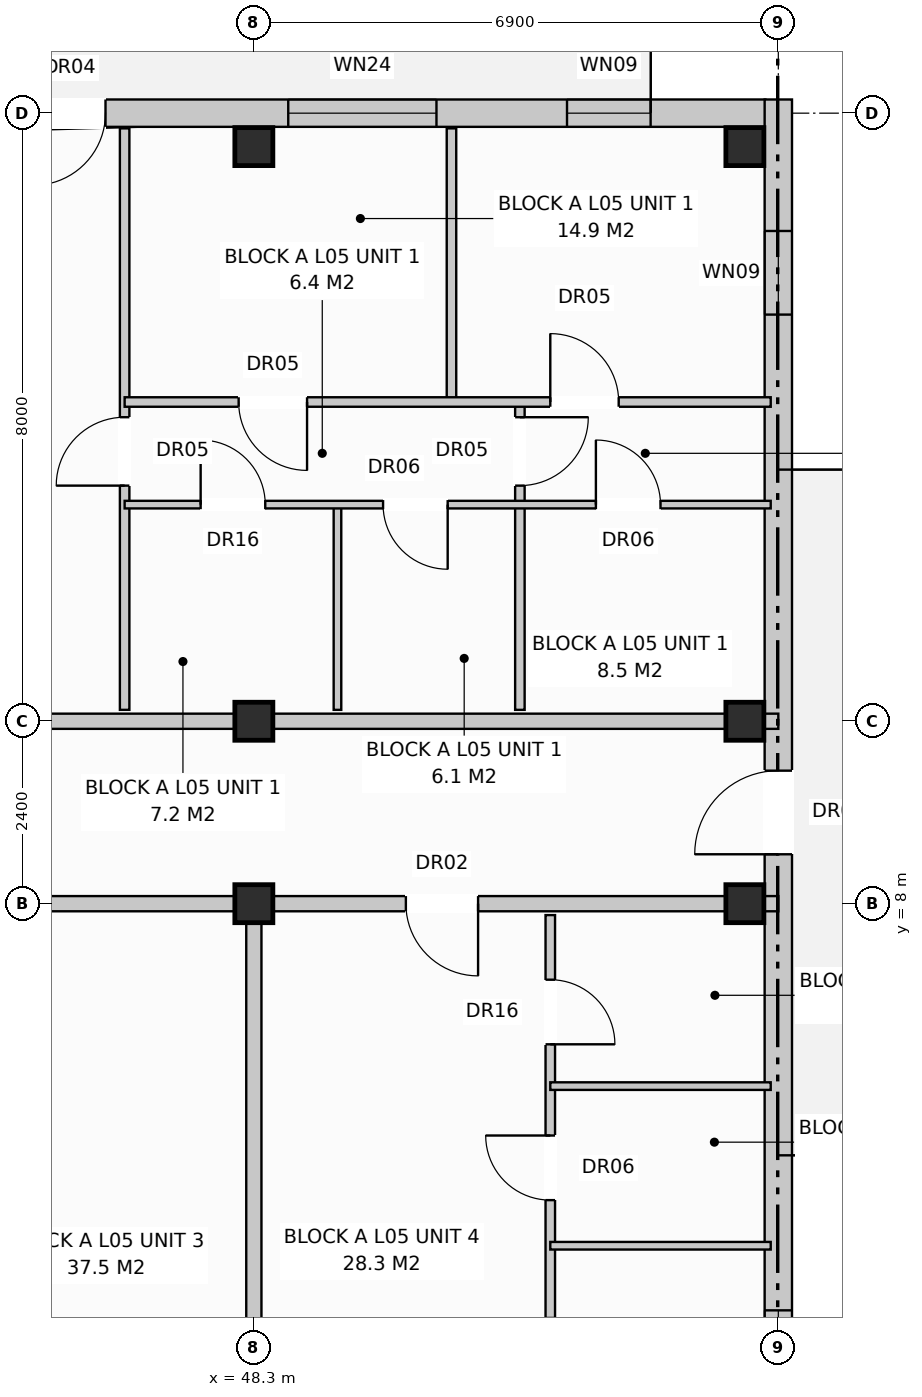
"""IFC4 building model, lengths in metres.
Left out: names, types, materials, properties, quantities, classifications, styles, units other than length and angle.
Written with IfcOpenShell. Run it as: python <this file> out.ifc"""

import sys

from ifc_helpers import new_model, si_unit, direction, frame, frame_2d, origin, origin_with_axes, origin_2d, place, context, subcontext, project, spatial, rectangle, extrude, element, fill, save


model = new_model("IFC4")
c1 = context("Model", 3, precision=1e-05, world=origin(), true_north=direction((0.0, 1.0)))
c2 = subcontext(c1, "Body", "Model", "MODEL_VIEW")
j1 = project(units=[si_unit("LENGTHUNIT", "METRE"), si_unit("PLANEANGLEUNIT", "RADIAN")], contexts=[c1])
p1 = place(None, origin())
s1 = spatial("IfcSite", under=j1, at=p1, CompositionType="ELEMENT")
p2 = place(p1, origin())
s2 = spatial("IfcBuilding", under=s1, at=p2, CompositionType="ELEMENT")
p3 = place(p2, frame((0.0, 0.0, 17.6)))
s3 = spatial("IfcBuildingStorey", under=s2, at=p3, CompositionType="ELEMENT", Elevation=17.6)
for number, where, z_axis, x_axis in (
    (1, (48.3, 8.0, 0.0), (0.0, 0.0, 1.0), (1.0, 0.0, 0.0)),
    (2, (48.3, 10.4, 0.0), (0.0, 0.0, 1.0), (1.0, 0.0, 0.0)),
    (3, (48.3, 17.96, 0.0), (0.0, 0.0, 1.0), (1.0, 0.0, 0.0)),
    (4, (54.76, 8.0, 0.0), (0.0, 0.0, 1.0), (1.0, 0.0, 0.0)),
    (5, (54.76, 10.4, 0.0), (0.0, 0.0, 1.0), (1.0, 0.0, 0.0)),
    (6, (54.76, 17.96, 0.0), (0.0, 0.0, 1.0), (1.0, 0.0, 0.0)),
):
    element("IfcColumn", number, at=place(p3, frame(where, z_axis=z_axis, x_axis=x_axis)), inside=s3, PredefinedType="COLUMN", context=c2, shape_type="SweptSolid", body=[
        extrude(rectangle(XDim=0.5, YDim=0.5, at=origin_2d()), origin(), (0.0, 0.0, 1.0), 3.2),
    ])
p4 = place(p3, frame((31.35, 18.4, 0.0), z_axis=(0.0, 0.0, 1.0), x_axis=(1.0, 0.0, 0.0)))
e7 = element("IfcWall", 7, at=p4, inside=s3, PredefinedType="STANDARD", context=c2, shape_type="SweptSolid", body=[
    extrude(rectangle(XDim=23.68, YDim=0.36, at=frame_2d((11.84, 0.0))), origin(), (0.0, 0.0, 1.0), 2.95),
])
p5 = place(p4, frame((14.048, 0.0, 0.0)))
e8 = element("IfcOpeningElement", 8, at=p5, cuts=e7, PredefinedType="OPENING", context=c2, shape_type="SweptSolid", body=[
    extrude(rectangle(XDim=0.95, YDim=2.1, at=frame_2d((0.475, 1.05))), frame((0.0, 0.192, 0.0), z_axis=(0.0, -1.0, 0.0), x_axis=(1.0, 0.0, 0.0)), (0.0, 0.0, 1.0), 0.384),
])
p6 = place(p4, frame((12.17, 0.0, 0.72)))
e9 = element("IfcOpeningElement", 9, at=p6, cuts=e7, PredefinedType="OPENING", context=c2, shape_type="SweptSolid", body=[
    extrude(rectangle(XDim=1.1, YDim=1.5, at=frame_2d((0.55, 0.75))), frame((0.0, 0.192, 0.0), z_axis=(0.0, -1.0, 0.0), x_axis=(1.0, 0.0, 0.0)), (0.0, 0.0, 1.0), 0.384),
])
p7 = place(p4, frame((17.403, 0.0, 0.8)))
e10 = element("IfcOpeningElement", 10, at=p7, cuts=e7, PredefinedType="OPENING", context=c2, shape_type="SweptSolid", body=[
    extrude(rectangle(XDim=1.95, YDim=1.65, at=frame_2d((0.975, 0.825))), frame((0.0, 0.192, 0.0), z_axis=(0.0, -1.0, 0.0), x_axis=(1.0, 0.0, 0.0)), (0.0, 0.0, 1.0), 0.384),
])
p8 = place(p4, frame((21.07, 0.0, 0.72)))
e11 = element("IfcOpeningElement", 11, at=p8, cuts=e7, PredefinedType="OPENING", context=c2, shape_type="SweptSolid", body=[
    extrude(rectangle(XDim=1.1, YDim=1.5, at=frame_2d((0.55, 0.75))), frame((0.0, 0.192, 0.0), z_axis=(0.0, -1.0, 0.0), x_axis=(1.0, 0.0, 0.0)), (0.0, 0.0, 1.0), 0.384),
])
p9 = place(p3, frame((55.2, -0.18, 0.0), z_axis=(0.0, 0.0, 1.0), x_axis=(0.0, 1.0, 0.0)))
e12 = element("IfcWall", 12, at=p9, inside=s3, PredefinedType="STANDARD", context=c2, shape_type="SweptSolid", body=[
    extrude(rectangle(XDim=18.76, YDim=0.36, at=frame_2d((9.38, 0.0))), origin(), (0.0, 0.0, 1.0), 2.95),
])
p10 = place(p9, frame((8.83, 0.0, 0.0)))
e13 = element("IfcOpeningElement", 13, at=p10, cuts=e12, PredefinedType="OPENING", context=c2, shape_type="SweptSolid", body=[
    extrude(rectangle(XDim=1.1, YDim=2.1, at=frame_2d((0.55, 1.05))), frame((0.0, 0.192, 0.0), z_axis=(0.0, -1.0, 0.0), x_axis=(1.0, 0.0, 0.0)), (0.0, 0.0, 1.0), 0.384),
])
p11 = place(p9, frame((1.73, 0.0, 0.72)))
e14 = element("IfcOpeningElement", 14, at=p11, cuts=e12, PredefinedType="OPENING", context=c2, shape_type="SweptSolid", body=[
    extrude(rectangle(XDim=1.1, YDim=1.5, at=frame_2d((0.55, 0.75))), frame((0.0, 0.192, 0.0), z_axis=(0.0, -1.0, 0.0), x_axis=(1.0, 0.0, 0.0)), (0.0, 0.0, 1.0), 0.384),
])
p12 = place(p9, frame((15.93, 0.0, 0.72)))
e15 = element("IfcOpeningElement", 15, at=p12, cuts=e12, PredefinedType="OPENING", context=c2, shape_type="SweptSolid", body=[
    extrude(rectangle(XDim=1.1, YDim=1.5, at=frame_2d((0.55, 0.75))), frame((0.0, 0.192, 0.0), z_axis=(0.0, -1.0, 0.0), x_axis=(1.0, 0.0, 0.0)), (0.0, 0.0, 1.0), 0.384),
])
p13 = place(p3, frame((48.3, 7.85, 0.0), z_axis=(0.0, 0.0, 1.0), x_axis=(0.0, -1.0, 0.0)))
e16 = element("IfcWall", 16, at=p13, inside=s3, PredefinedType="PARTITIONING", context=c2, shape_type="SweptSolid", body=[
    extrude(rectangle(XDim=7.7, YDim=0.2, at=frame_2d((3.85, 0.0))), origin(), (0.0, 0.0, 1.0), 2.39),
])
p14 = place(p3, frame((34.5, 8.0, 0.0), z_axis=(0.0, 0.0, 1.0), x_axis=(1.0, 0.0, 0.0)))
e17 = element("IfcWall", 17, at=p14, inside=s3, PredefinedType="PARTITIONING", context=c2, shape_type="SweptSolid", body=[
    extrude(rectangle(XDim=13.8, YDim=0.2, at=frame_2d((6.9, 0.0))), origin(), (0.0, 0.0, 1.0), 2.39),
])
p15 = place(p14, frame((9.6, 0.0, 0.0)))
e18 = element("IfcOpeningElement", 18, at=p15, cuts=e17, PredefinedType="OPENING", context=c2, shape_type="SweptSolid", body=[
    extrude(rectangle(XDim=0.95, YDim=2.15, at=frame_2d((0.475, 1.075))), frame((0.0, 0.112, 0.0), z_axis=(0.0, -1.0, 0.0), x_axis=(1.0, 0.0, 0.0)), (0.0, 0.0, 1.0), 0.224),
])
p16 = place(p3, frame((48.3, 8.0, 0.0), z_axis=(0.0, 0.0, 1.0), x_axis=(1.0, 0.0, 0.0)))
e19 = element("IfcWall", 19, at=p16, inside=s3, PredefinedType="PARTITIONING", context=c2, shape_type="SweptSolid", body=[
    extrude(rectangle(XDim=6.9, YDim=0.2, at=frame_2d((3.45, 0.0))), origin(), (0.0, 0.0, 1.0), 2.39),
])
p17 = place(p16, frame((2.0, 0.0, 0.0)))
e20 = element("IfcOpeningElement", 20, at=p17, cuts=e19, PredefinedType="OPENING", context=c2, shape_type="SweptSolid", body=[
    extrude(rectangle(XDim=0.95, YDim=2.15, at=frame_2d((0.475, 1.075))), frame((0.0, 0.112, 0.0), z_axis=(0.0, -1.0, 0.0), x_axis=(1.0, 0.0, 0.0)), (0.0, 0.0, 1.0), 0.224),
])
p18 = place(p3, frame((52.2, 7.85, 0.0), z_axis=(0.0, 0.0, 1.0), x_axis=(0.0, -1.0, 0.0)))
e21 = element("IfcWall", 21, at=p18, inside=s3, PredefinedType="PARTITIONING", context=c2, shape_type="SweptSolid", body=[
    extrude(rectangle(XDim=7.65, YDim=0.125, at=frame_2d((3.825, 0.0))), origin(), (0.0, 0.0, 1.0), 2.95),
])
p19 = place(p18, frame((0.85, 0.0, 0.0)))
e22 = element("IfcOpeningElement", 22, at=p19, cuts=e21, PredefinedType="OPENING", context=c2, shape_type="SweptSolid", body=[
    extrude(rectangle(XDim=0.85, YDim=2.1, at=frame_2d((0.425, 1.05))), frame((0.0, 0.074, 0.0), z_axis=(0.0, -1.0, 0.0), x_axis=(1.0, 0.0, 0.0)), (0.0, 0.0, 1.0), 0.149),
])
p20 = place(p18, frame((2.9, 0.0, 0.0)))
e23 = element("IfcOpeningElement", 23, at=p20, cuts=e21, PredefinedType="OPENING", context=c2, shape_type="SweptSolid", body=[
    extrude(rectangle(XDim=0.85, YDim=2.05, at=frame_2d((0.425, 1.025))), frame((0.0, 0.074, 0.0), z_axis=(0.0, -1.0, 0.0), x_axis=(1.0, 0.0, 0.0)), (0.0, 0.0, 1.0), 0.149),
])
p21 = place(p18, frame((5.3, 0.0, 0.0)))
e24 = element("IfcOpeningElement", 24, at=p21, cuts=e21, PredefinedType="OPENING", context=c2, shape_type="SweptSolid", body=[
    extrude(rectangle(XDim=0.9, YDim=2.1, at=frame_2d((0.45, 1.05))), frame((0.0, 0.074, 0.0), z_axis=(0.0, -1.0, 0.0), x_axis=(1.0, 0.0, 0.0)), (0.0, 0.0, 1.0), 0.149),
])
for number, where, z_axis, x_axis in (
    (25, (52.2, 5.6, 0.0), (0.0, 0.0, 1.0), (1.0, 0.0, 0.0)),
    (26, (52.2, 3.5, 0.0), (0.0, 0.0, 1.0), (1.0, 0.0, 0.0)),
):
    element("IfcWall", number, at=place(p3, frame(where, z_axis=z_axis, x_axis=x_axis)), inside=s3, PredefinedType="PARTITIONING", context=c2, shape_type="SweptSolid", body=[
        extrude(rectangle(XDim=2.9, YDim=0.1, at=frame_2d((1.45, 0.0))), origin(), (0.0, 0.0, 1.0), 2.95),
    ])
p22 = place(p3, frame((41.4, 10.4, 0.0), z_axis=(0.0, 0.0, 1.0), x_axis=(1.0, 0.0, 0.0)))
e27 = element("IfcWall", 27, at=p22, inside=s3, PredefinedType="PARTITIONING", context=c2, shape_type="SweptSolid", body=[
    extrude(rectangle(XDim=13.8, YDim=0.2, at=frame_2d((6.9, 0.0))), origin(), (0.0, 0.0, 1.0), 2.39),
])
p23 = place(p22, frame((2.4, 0.0, 0.0)))
e28 = element("IfcOpeningElement", 28, at=p23, cuts=e27, PredefinedType="OPENING", context=c2, shape_type="SweptSolid", body=[
    extrude(rectangle(XDim=0.95, YDim=2.15, at=frame_2d((0.475, 1.075))), frame((0.0, 0.112, 0.0), z_axis=(0.0, -1.0, 0.0), x_axis=(1.0, 0.0, 0.0)), (0.0, 0.0, 1.0), 0.224),
])
p24 = place(p3, frame((46.6, 10.55, 0.0), z_axis=(0.0, 0.0, 1.0), x_axis=(0.0, 1.0, 0.0)))
e29 = element("IfcWall", 29, at=p24, inside=s3, PredefinedType="PARTITIONING", context=c2, shape_type="SweptSolid", body=[
    extrude(rectangle(XDim=7.65, YDim=0.125, at=frame_2d((3.825, 0.0))), origin(), (0.0, 0.0, 1.0), 2.95),
])
p25 = place(p24, frame((2.95, 0.0, 0.0)))
e30 = element("IfcOpeningElement", 30, at=p25, cuts=e29, PredefinedType="OPENING", context=c2, shape_type="SweptSolid", body=[
    extrude(rectangle(XDim=0.9, YDim=2.1, at=frame_2d((0.45, 1.05))), frame((0.0, 0.074, 0.0), z_axis=(0.0, -1.0, 0.0), x_axis=(1.0, 0.0, 0.0)), (0.0, 0.0, 1.0), 0.149),
])
p26 = place(p3, frame((49.4, 10.55, 0.0), z_axis=(0.0, 0.0, 1.0), x_axis=(0.0, 1.0, 0.0)))
e31 = element("IfcWall", 31, at=p26, inside=s3, PredefinedType="PARTITIONING", context=c2, shape_type="SweptSolid", body=[
    extrude(rectangle(XDim=2.7, YDim=0.1, at=frame_2d((1.35, 0.0))), origin(), (0.0, 0.0, 1.0), 2.95),
])
p27 = place(p3, frame((51.8, 10.55, 0.0), z_axis=(0.0, 0.0, 1.0), x_axis=(0.0, 1.0, 0.0)))
e32 = element("IfcWall", 32, at=p27, inside=s3, PredefinedType="PARTITIONING", context=c2, shape_type="SweptSolid", body=[
    extrude(rectangle(XDim=4.05, YDim=0.125, at=frame_2d((2.025, 0.0))), origin(), (0.0, 0.0, 1.0), 2.95),
])
p28 = place(p27, frame((2.95, 0.0, 0.0)))
e33 = element("IfcOpeningElement", 33, at=p28, cuts=e32, PredefinedType="OPENING", context=c2, shape_type="SweptSolid", body=[
    extrude(rectangle(XDim=0.9, YDim=2.1, at=frame_2d((0.45, 1.05))), frame((0.0, 0.074, 0.0), z_axis=(0.0, -1.0, 0.0), x_axis=(1.0, 0.0, 0.0)), (0.0, 0.0, 1.0), 0.149),
])
p29 = place(p3, frame((50.9, 14.6, 0.0), z_axis=(0.0, 0.0, 1.0), x_axis=(0.0, 1.0, 0.0)))
e34 = element("IfcWall", 34, at=p29, inside=s3, PredefinedType="PARTITIONING", context=c2, shape_type="SweptSolid", body=[
    extrude(rectangle(XDim=3.6, YDim=0.125, at=frame_2d((1.8, 0.0))), origin(), (0.0, 0.0, 1.0), 2.95),
])
p30 = place(p3, frame((46.6, 13.25, 0.0), z_axis=(0.0, 0.0, 1.0), x_axis=(1.0, 0.0, 0.0)))
e35 = element("IfcWall", 35, at=p30, inside=s3, PredefinedType="PARTITIONING", context=c2, shape_type="SweptSolid", body=[
    extrude(rectangle(XDim=8.5, YDim=0.1, at=frame_2d((4.25, 0.0))), origin(), (0.0, 0.0, 1.0), 2.95),
])
p31 = place(p30, frame((1.0, 0.0, 0.0)))
e36 = element("IfcOpeningElement", 36, at=p31, cuts=e35, PredefinedType="OPENING", context=c2, shape_type="SweptSolid", body=[
    extrude(rectangle(XDim=0.85, YDim=2.1, at=frame_2d((0.425, 1.05))), frame((0.0, 0.062, 0.0), z_axis=(0.0, -1.0, 0.0), x_axis=(1.0, 0.0, 0.0)), (0.0, 0.0, 1.0), 0.124),
])
p32 = place(p30, frame((3.4, 0.0, 0.0)))
e37 = element("IfcOpeningElement", 37, at=p32, cuts=e35, PredefinedType="OPENING", context=c2, shape_type="SweptSolid", body=[
    extrude(rectangle(XDim=0.85, YDim=2.05, at=frame_2d((0.425, 1.025))), frame((0.0, 0.062, 0.0), z_axis=(0.0, -1.0, 0.0), x_axis=(1.0, 0.0, 0.0)), (0.0, 0.0, 1.0), 0.124),
])
p33 = place(p30, frame((6.2, 0.0, 0.0)))
e38 = element("IfcOpeningElement", 38, at=p33, cuts=e35, PredefinedType="OPENING", context=c2, shape_type="SweptSolid", body=[
    extrude(rectangle(XDim=0.85, YDim=2.05, at=frame_2d((0.425, 1.025))), frame((0.0, 0.062, 0.0), z_axis=(0.0, -1.0, 0.0), x_axis=(1.0, 0.0, 0.0)), (0.0, 0.0, 1.0), 0.124),
])
p34 = place(p3, frame((46.6, 14.6, 0.0), z_axis=(0.0, 0.0, 1.0), x_axis=(1.0, 0.0, 0.0)))
e39 = element("IfcWall", 39, at=p34, inside=s3, PredefinedType="PARTITIONING", context=c2, shape_type="SweptSolid", body=[
    extrude(rectangle(XDim=8.5, YDim=0.125, at=frame_2d((4.25, 0.0))), origin(), (0.0, 0.0, 1.0), 2.95),
])
p35 = place(p34, frame((1.5, 0.0, 0.0)))
e40 = element("IfcOpeningElement", 40, at=p35, cuts=e39, PredefinedType="OPENING", context=c2, shape_type="SweptSolid", body=[
    extrude(rectangle(XDim=0.9, YDim=2.1, at=frame_2d((0.45, 1.05))), frame((0.0, 0.074, 0.0), z_axis=(0.0, -1.0, 0.0), x_axis=(1.0, 0.0, 0.0)), (0.0, 0.0, 1.0), 0.149),
])
p36 = place(p34, frame((5.6, 0.0, 0.0)))
e41 = element("IfcOpeningElement", 41, at=p36, cuts=e39, PredefinedType="OPENING", context=c2, shape_type="SweptSolid", body=[
    extrude(rectangle(XDim=0.9, YDim=2.1, at=frame_2d((0.45, 1.05))), frame((0.0, 0.074, 0.0), z_axis=(0.0, -1.0, 0.0), x_axis=(1.0, 0.0, 0.0)), (0.0, 0.0, 1.0), 0.149),
])
p37 = place(p5, frame((0.95, 0.0, 0.0), z_axis=(0.0, 0.0, 1.0), x_axis=(-1.0, 0.0, 0.0)))
e42 = element("IfcDoor", 42, at=p37, inside=s3, OperationType="SINGLE_SWING_LEFT", PredefinedType="DOOR", context=c2, shape_type="SweptSolid", body=[
    extrude(rectangle(XDim=0.95, YDim=2.1, at=frame_2d((0.475, 1.05))), frame((0.0, 0.025, 0.0), z_axis=(0.0, -1.0, 0.0), x_axis=(1.0, 0.0, 0.0)), (0.0, 0.0, 1.0), 0.05),
])
fill(e8, e42)
p38 = place(p7, origin_with_axes())
e43 = element("IfcWindow", 43, at=p38, inside=s3, PartitioningType="SINGLE_PANEL", PredefinedType="WINDOW", context=c2, shape_type="SweptSolid", body=[
    extrude(rectangle(XDim=1.95, YDim=1.65, at=frame_2d((0.975, 0.825))), frame((0.0, 0.03, 0.0), z_axis=(0.0, -1.0, 0.0), x_axis=(1.0, 0.0, 0.0)), (0.0, 0.0, 1.0), 0.06),
])
fill(e10, e43)
p39 = place(p8, origin_with_axes())
e44 = element("IfcWindow", 44, at=p39, inside=s3, PartitioningType="SINGLE_PANEL", PredefinedType="WINDOW", context=c2, shape_type="SweptSolid", body=[
    extrude(rectangle(XDim=1.1, YDim=1.5, at=frame_2d((0.55, 0.75))), frame((0.0, 0.03, 0.0), z_axis=(0.0, -1.0, 0.0), x_axis=(1.0, 0.0, 0.0)), (0.0, 0.0, 1.0), 0.06),
])
fill(e11, e44)
p40 = place(p10, origin_with_axes())
e45 = element("IfcDoor", 45, at=p40, inside=s3, OperationType="SINGLE_SWING_LEFT", PredefinedType="DOOR", context=c2, shape_type="SweptSolid", body=[
    extrude(rectangle(XDim=1.1, YDim=2.1, at=frame_2d((0.55, 1.05))), frame((0.0, 0.025, 0.0), z_axis=(0.0, -1.0, 0.0), x_axis=(1.0, 0.0, 0.0)), (0.0, 0.0, 1.0), 0.05),
])
fill(e13, e45)
p41 = place(p11, origin_with_axes())
e46 = element("IfcWindow", 46, at=p41, inside=s3, PartitioningType="SINGLE_PANEL", PredefinedType="WINDOW", context=c2, shape_type="SweptSolid", body=[
    extrude(rectangle(XDim=1.1, YDim=1.5, at=frame_2d((0.55, 0.75))), frame((0.0, 0.03, 0.0), z_axis=(0.0, -1.0, 0.0), x_axis=(1.0, 0.0, 0.0)), (0.0, 0.0, 1.0), 0.06),
])
fill(e14, e46)
p42 = place(p12, origin_with_axes())
e47 = element("IfcWindow", 47, at=p42, inside=s3, PartitioningType="SINGLE_PANEL", PredefinedType="WINDOW", context=c2, shape_type="SweptSolid", body=[
    extrude(rectangle(XDim=1.1, YDim=1.5, at=frame_2d((0.55, 0.75))), frame((0.0, 0.03, 0.0), z_axis=(0.0, -1.0, 0.0), x_axis=(1.0, 0.0, 0.0)), (0.0, 0.0, 1.0), 0.06),
])
fill(e15, e47)
p43 = place(p17, frame((0.95, 0.0, 0.0), z_axis=(0.0, 0.0, 1.0), x_axis=(-1.0, 0.0, 0.0)))
e48 = element("IfcDoor", 48, at=p43, inside=s3, OperationType="SINGLE_SWING_RIGHT", PredefinedType="DOOR", context=c2, shape_type="SweptSolid", body=[
    extrude(rectangle(XDim=0.95, YDim=2.15, at=frame_2d((0.475, 1.075))), frame((0.0, 0.025, 0.0), z_axis=(0.0, -1.0, 0.0), x_axis=(1.0, 0.0, 0.0)), (0.0, 0.0, 1.0), 0.05),
])
fill(e20, e48)
p44 = place(p19, origin_with_axes())
e49 = element("IfcDoor", 49, at=p44, inside=s3, OperationType="SINGLE_SWING_RIGHT", PredefinedType="DOOR", context=c2, shape_type="SweptSolid", body=[
    extrude(rectangle(XDim=0.85, YDim=2.1, at=frame_2d((0.425, 1.05))), frame((0.0, 0.025, 0.0), z_axis=(0.0, -1.0, 0.0), x_axis=(1.0, 0.0, 0.0)), (0.0, 0.0, 1.0), 0.05),
])
fill(e22, e49)
p45 = place(p20, frame((0.85, 0.0, 0.0), z_axis=(0.0, 0.0, 1.0), x_axis=(-1.0, 0.0, 0.0)))
e50 = element("IfcDoor", 50, at=p45, inside=s3, OperationType="SINGLE_SWING_LEFT", PredefinedType="DOOR", context=c2, shape_type="SweptSolid", body=[
    extrude(rectangle(XDim=0.85, YDim=2.05, at=frame_2d((0.425, 1.025))), frame((0.0, 0.025, 0.0), z_axis=(0.0, -1.0, 0.0), x_axis=(1.0, 0.0, 0.0)), (0.0, 0.0, 1.0), 0.05),
])
fill(e23, e50)
p46 = place(p25, origin_with_axes())
e51 = element("IfcDoor", 51, at=p46, inside=s3, OperationType="SINGLE_SWING_LEFT", PredefinedType="DOOR", context=c2, shape_type="SweptSolid", body=[
    extrude(rectangle(XDim=0.9, YDim=2.1, at=frame_2d((0.45, 1.05))), frame((0.0, 0.025, 0.0), z_axis=(0.0, -1.0, 0.0), x_axis=(1.0, 0.0, 0.0)), (0.0, 0.0, 1.0), 0.05),
])
fill(e30, e51)
p47 = place(p28, frame((0.9, 0.0, 0.0), z_axis=(0.0, 0.0, 1.0), x_axis=(-1.0, 0.0, 0.0)))
e52 = element("IfcDoor", 52, at=p47, inside=s3, OperationType="SINGLE_SWING_RIGHT", PredefinedType="DOOR", context=c2, shape_type="SweptSolid", body=[
    extrude(rectangle(XDim=0.9, YDim=2.1, at=frame_2d((0.45, 1.05))), frame((0.0, 0.025, 0.0), z_axis=(0.0, -1.0, 0.0), x_axis=(1.0, 0.0, 0.0)), (0.0, 0.0, 1.0), 0.05),
])
fill(e33, e52)
p48 = place(p31, origin_with_axes())
e53 = element("IfcDoor", 53, at=p48, inside=s3, OperationType="SINGLE_SWING_LEFT", PredefinedType="DOOR", context=c2, shape_type="SweptSolid", body=[
    extrude(rectangle(XDim=0.85, YDim=2.1, at=frame_2d((0.425, 1.05))), frame((0.0, 0.025, 0.0), z_axis=(0.0, -1.0, 0.0), x_axis=(1.0, 0.0, 0.0)), (0.0, 0.0, 1.0), 0.05),
])
fill(e36, e53)
p49 = place(p32, frame((0.85, 0.0, 0.0), z_axis=(0.0, 0.0, 1.0), x_axis=(-1.0, 0.0, 0.0)))
e54 = element("IfcDoor", 54, at=p49, inside=s3, OperationType="SINGLE_SWING_RIGHT", PredefinedType="DOOR", context=c2, shape_type="SweptSolid", body=[
    extrude(rectangle(XDim=0.85, YDim=2.05, at=frame_2d((0.425, 1.025))), frame((0.0, 0.025, 0.0), z_axis=(0.0, -1.0, 0.0), x_axis=(1.0, 0.0, 0.0)), (0.0, 0.0, 1.0), 0.05),
])
fill(e37, e54)
p50 = place(p33, origin_with_axes())
e55 = element("IfcDoor", 55, at=p50, inside=s3, OperationType="SINGLE_SWING_LEFT", PredefinedType="DOOR", context=c2, shape_type="SweptSolid", body=[
    extrude(rectangle(XDim=0.85, YDim=2.05, at=frame_2d((0.425, 1.025))), frame((0.0, 0.025, 0.0), z_axis=(0.0, -1.0, 0.0), x_axis=(1.0, 0.0, 0.0)), (0.0, 0.0, 1.0), 0.05),
])
fill(e38, e55)
p51 = place(p35, frame((0.9, 0.0, 0.0), z_axis=(0.0, 0.0, 1.0), x_axis=(-1.0, 0.0, 0.0)))
e56 = element("IfcDoor", 56, at=p51, inside=s3, OperationType="SINGLE_SWING_RIGHT", PredefinedType="DOOR", context=c2, shape_type="SweptSolid", body=[
    extrude(rectangle(XDim=0.9, YDim=2.1, at=frame_2d((0.45, 1.05))), frame((0.0, 0.025, 0.0), z_axis=(0.0, -1.0, 0.0), x_axis=(1.0, 0.0, 0.0)), (0.0, 0.0, 1.0), 0.05),
])
fill(e40, e56)
p52 = place(p36, origin_with_axes())
e57 = element("IfcDoor", 57, at=p52, inside=s3, OperationType="SINGLE_SWING_LEFT", PredefinedType="DOOR", context=c2, shape_type="SweptSolid", body=[
    extrude(rectangle(XDim=0.9, YDim=2.1, at=frame_2d((0.45, 1.05))), frame((0.0, 0.025, 0.0), z_axis=(0.0, -1.0, 0.0), x_axis=(1.0, 0.0, 0.0)), (0.0, 0.0, 1.0), 0.05),
])
fill(e41, e57)
save(model, sys.argv[1])
